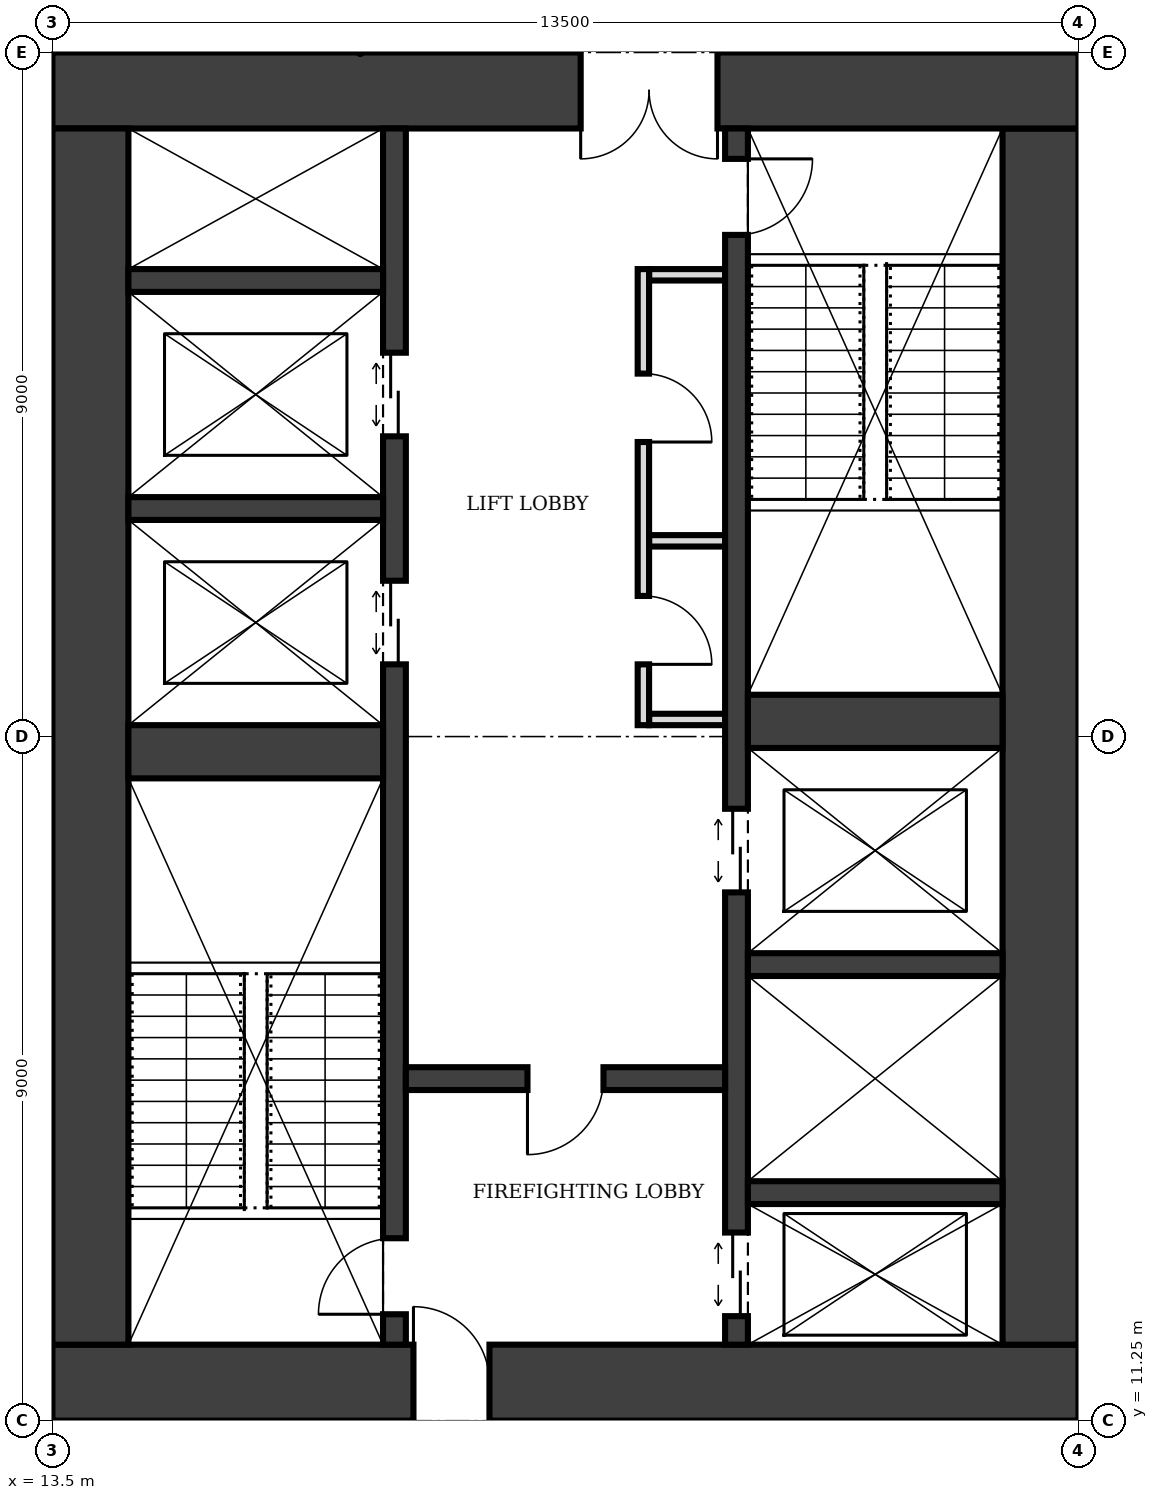
"""IFC4 building model, lengths in metres.
Left out: names, types, materials, properties, quantities, classifications, styles, units other than length and angle.
Written with IfcOpenShell. Run it as: python <this file> out.ifc"""

import sys

from ifc_helpers import new_model, si_unit, direction, frame, frame_2d, origin, place, context, subcontext, project, spatial, rectangle, extrude, element, fill, save


model = new_model("IFC4")
c1 = context("Model", 3, precision=1e-05, world=origin(), true_north=direction((0.0, 1.0)))
c2 = subcontext(c1, "Body", "Model", "MODEL_VIEW")
j1 = project(units=[si_unit("LENGTHUNIT", "METRE"), si_unit("PLANEANGLEUNIT", "RADIAN")], contexts=[c1])
p1 = place(None, origin())
s1 = spatial("IfcSite", under=j1, at=p1, CompositionType="ELEMENT")
p2 = place(p1, origin())
s2 = spatial("IfcBuilding", under=s1, at=p2, CompositionType="ELEMENT")
p3 = place(p2, frame((0.0, 0.0, 49.0)))
s3 = spatial("IfcBuildingStorey", under=s2, at=p3, CompositionType="ELEMENT", Elevation=49.0)
p4 = place(p3, frame((13.5, 11.75, 0.0), z_axis=(0.0, 0.0, 1.0), x_axis=(1.0, 0.0, 0.0)))
e1 = element("IfcWall", 1, at=p4, inside=s3, PredefinedType="SHEAR", context=c2, shape_type="SweptSolid", body=[
    extrude(rectangle(XDim=13.5, YDim=1.0, at=frame_2d((6.75, 0.0))), origin(), (0.0, 0.0, 1.0), 4.0),
])
p5 = place(p4, frame((4.75, 0.0, 0.0)))
e2 = element("IfcOpeningElement", 2, at=p5, cuts=e1, PredefinedType="OPENING", context=c2, shape_type="SweptSolid", body=[
    extrude(rectangle(XDim=1.0, YDim=2.1, at=frame_2d((0.5, 1.05))), frame((0.0, 0.51, 0.0), z_axis=(0.0, -1.0, 0.0), x_axis=(1.0, 0.0, 0.0)), (0.0, 0.0, 1.0), 1.02),
])
p6 = place(p3, frame((26.5, 12.25, 0.0), z_axis=(0.0, 0.0, 1.0), x_axis=(0.0, 1.0, 0.0)))
e3 = element("IfcWall", 3, at=p6, inside=s3, PredefinedType="SHEAR", context=c2, shape_type="SweptSolid", body=[
    extrude(rectangle(XDim=16.0, YDim=1.0, at=frame_2d((8.0, 0.0))), origin(), (0.0, 0.0, 1.0), 4.0),
])
p7 = place(p3, frame((27.0, 28.75, 0.0), z_axis=(0.0, 0.0, 1.0), x_axis=(-1.0, 0.0, 0.0)))
e4 = element("IfcWall", 4, at=p7, inside=s3, PredefinedType="SHEAR", context=c2, shape_type="SweptSolid", body=[
    extrude(rectangle(XDim=13.5, YDim=1.0, at=frame_2d((6.75, 0.0))), origin(), (0.0, 0.0, 1.0), 4.0),
])
p8 = place(p7, frame((4.75, 0.0, 0.0)))
e5 = element("IfcOpeningElement", 5, at=p8, cuts=e4, PredefinedType="OPENING", context=c2, shape_type="SweptSolid", body=[
    extrude(rectangle(XDim=1.8, YDim=2.1, at=frame_2d((0.9, 1.05))), frame((0.0, 0.51, 0.0), z_axis=(0.0, -1.0, 0.0), x_axis=(1.0, 0.0, 0.0)), (0.0, 0.0, 1.0), 1.02),
])
p9 = place(p3, frame((14.0, 28.25, 0.0), z_axis=(0.0, 0.0, 1.0), x_axis=(0.0, -1.0, 0.0)))
e6 = element("IfcWall", 6, at=p9, inside=s3, PredefinedType="SHEAR", context=c2, shape_type="SweptSolid", body=[
    extrude(rectangle(XDim=16.0, YDim=1.0, at=frame_2d((8.0, 0.0))), origin(), (0.0, 0.0, 1.0), 4.0),
])
p10 = place(p3, frame((18.0, 12.25, 0.0), z_axis=(0.0, 0.0, 1.0), x_axis=(0.0, 1.0, 0.0)))
e7 = element("IfcWall", 7, at=p10, inside=s3, PredefinedType="SHEAR", context=c2, shape_type="SweptSolid", body=[
    extrude(rectangle(XDim=16.0, YDim=0.3, at=frame_2d((8.0, 0.0))), origin(), (0.0, 0.0, 1.0), 4.0),
])
p11 = place(p10, frame((0.4, 0.0, 0.0)))
e8 = element("IfcOpeningElement", 8, at=p11, cuts=e7, PredefinedType="OPENING", context=c2, shape_type="SweptSolid", body=[
    extrude(rectangle(XDim=1.0, YDim=2.1, at=frame_2d((0.5, 1.05))), frame((0.0, 0.16, 0.0), z_axis=(0.0, -1.0, 0.0), x_axis=(1.0, 0.0, 0.0)), (0.0, 0.0, 1.0), 0.32),
])
p12 = place(p10, frame((8.95, 0.0, 0.0)))
e9 = element("IfcOpeningElement", 9, at=p12, cuts=e7, PredefinedType="OPENING", context=c2, shape_type="SweptSolid", body=[
    extrude(rectangle(XDim=1.1, YDim=2.1, at=frame_2d((0.55, 1.05))), frame((0.0, 0.16, 0.0), z_axis=(0.0, -1.0, 0.0), x_axis=(1.0, 0.0, 0.0)), (0.0, 0.0, 1.0), 0.32),
])
p13 = place(p10, frame((11.95, 0.0, 0.0)))
e10 = element("IfcOpeningElement", 10, at=p13, cuts=e7, PredefinedType="OPENING", context=c2, shape_type="SweptSolid", body=[
    extrude(rectangle(XDim=1.1, YDim=2.1, at=frame_2d((0.55, 1.05))), frame((0.0, 0.16, 0.0), z_axis=(0.0, -1.0, 0.0), x_axis=(1.0, 0.0, 0.0)), (0.0, 0.0, 1.0), 0.32),
])
p14 = place(p3, frame((22.5, 12.25, 0.0), z_axis=(0.0, 0.0, 1.0), x_axis=(0.0, 1.0, 0.0)))
e11 = element("IfcWall", 11, at=p14, inside=s3, PredefinedType="SHEAR", context=c2, shape_type="SweptSolid", body=[
    extrude(rectangle(XDim=16.0, YDim=0.3, at=frame_2d((8.0, 0.0))), origin(), (0.0, 0.0, 1.0), 4.0),
])
p15 = place(p14, frame((14.6, 0.0, 0.0)))
e12 = element("IfcOpeningElement", 12, at=p15, cuts=e11, PredefinedType="OPENING", context=c2, shape_type="SweptSolid", body=[
    extrude(rectangle(XDim=1.0, YDim=2.1, at=frame_2d((0.5, 1.05))), frame((0.0, 0.16, 0.0), z_axis=(0.0, -1.0, 0.0), x_axis=(1.0, 0.0, 0.0)), (0.0, 0.0, 1.0), 0.32),
])
p16 = place(p14, frame((0.375, 0.0, 0.0)))
e13 = element("IfcOpeningElement", 13, at=p16, cuts=e11, PredefinedType="OPENING", context=c2, shape_type="SweptSolid", body=[
    extrude(rectangle(XDim=1.1, YDim=2.1, at=frame_2d((0.55, 1.05))), frame((0.0, 0.16, 0.0), z_axis=(0.0, -1.0, 0.0), x_axis=(1.0, 0.0, 0.0)), (0.0, 0.0, 1.0), 0.32),
])
p17 = place(p14, frame((5.95, 0.0, 0.0)))
e14 = element("IfcOpeningElement", 14, at=p17, cuts=e11, PredefinedType="OPENING", context=c2, shape_type="SweptSolid", body=[
    extrude(rectangle(XDim=1.1, YDim=2.1, at=frame_2d((0.55, 1.05))), frame((0.0, 0.16, 0.0), z_axis=(0.0, -1.0, 0.0), x_axis=(1.0, 0.0, 0.0)), (0.0, 0.0, 1.0), 0.32),
])
p18 = place(p3, frame((14.5, 20.05, 0.0), z_axis=(0.0, 0.0, 1.0), x_axis=(1.0, 0.0, 0.0)))
e15 = element("IfcWall", 15, at=p18, inside=s3, PredefinedType="SHEAR", context=c2, shape_type="SweptSolid", body=[
    extrude(rectangle(XDim=3.35, YDim=0.7, at=frame_2d((1.675, 0.0))), origin(), (0.0, 0.0, 1.0), 4.0),
])
p19 = place(p3, frame((18.15, 15.75, 0.0), z_axis=(0.0, 0.0, 1.0), x_axis=(1.0, 0.0, 0.0)))
e16 = element("IfcWall", 16, at=p19, inside=s3, PredefinedType="SHEAR", context=c2, shape_type="SweptSolid", body=[
    extrude(rectangle(XDim=4.2, YDim=0.3, at=frame_2d((2.1, 0.0))), origin(), (0.0, 0.0, 1.0), 4.0),
])
p20 = place(p19, frame((1.6, 0.0, 0.0)))
e17 = element("IfcOpeningElement", 17, at=p20, cuts=e16, PredefinedType="OPENING", context=c2, shape_type="SweptSolid", body=[
    extrude(rectangle(XDim=1.0, YDim=2.1, at=frame_2d((0.5, 1.05))), frame((0.0, 0.16, 0.0), z_axis=(0.0, -1.0, 0.0), x_axis=(1.0, 0.0, 0.0)), (0.0, 0.0, 1.0), 0.32),
])
for number, where, z_axis, x_axis in (
    (18, (22.65, 14.25, 0.0), (0.0, 0.0, 1.0), (1.0, 0.0, 0.0)),
    (19, (22.65, 17.25, 0.0), (0.0, 0.0, 1.0), (1.0, 0.0, 0.0)),
):
    element("IfcWall", number, at=place(p3, frame(where, z_axis=z_axis, x_axis=x_axis)), inside=s3, PredefinedType="SHEAR", context=c2, shape_type="SweptSolid", body=[
        extrude(rectangle(XDim=3.35, YDim=0.3, at=frame_2d((1.675, 0.0))), origin(), (0.0, 0.0, 1.0), 4.0),
    ])
p21 = place(p3, frame((22.65, 20.45, 0.0), z_axis=(0.0, 0.0, 1.0), x_axis=(1.0, 0.0, 0.0)))
e20 = element("IfcWall", 20, at=p21, inside=s3, PredefinedType="SHEAR", context=c2, shape_type="SweptSolid", body=[
    extrude(rectangle(XDim=3.35, YDim=0.7, at=frame_2d((1.675, 0.0))), origin(), (0.0, 0.0, 1.0), 4.0),
])
for number, where, z_axis, x_axis in (
    (21, (14.5, 23.25, 0.0), (0.0, 0.0, 1.0), (1.0, 0.0, 0.0)),
    (22, (14.5, 26.25, 0.0), (0.0, 0.0, 1.0), (1.0, 0.0, 0.0)),
):
    element("IfcWall", number, at=place(p3, frame(where, z_axis=z_axis, x_axis=x_axis)), inside=s3, PredefinedType="SHEAR", context=c2, shape_type="SweptSolid", body=[
        extrude(rectangle(XDim=3.35, YDim=0.3, at=frame_2d((1.675, 0.0))), origin(), (0.0, 0.0, 1.0), 4.0),
    ])
p22 = place(p3, frame((21.275, 20.4, 0.0), z_axis=(0.0, 0.0, 1.0), x_axis=(0.0, 1.0, 0.0)))
e23 = element("IfcWall", 23, at=p22, inside=s3, PredefinedType="PARTITIONING", context=c2, shape_type="SweptSolid", body=[
    extrude(rectangle(XDim=6.0, YDim=0.15, at=frame_2d((3.0, 0.0))), origin(), (0.0, 0.0, 1.0), 3.75),
])
p23 = place(p22, frame((0.8, 0.0, 0.0)))
e24 = element("IfcOpeningElement", 24, at=p23, cuts=e23, PredefinedType="OPENING", context=c2, shape_type="SweptSolid", body=[
    extrude(rectangle(XDim=0.9, YDim=2.1, at=frame_2d((0.45, 1.05))), frame((0.0, 0.085, 0.0), z_axis=(0.0, -1.0, 0.0), x_axis=(1.0, 0.0, 0.0)), (0.0, 0.0, 1.0), 0.17),
])
p24 = place(p22, frame((3.725, 0.0, 0.0)))
e25 = element("IfcOpeningElement", 25, at=p24, cuts=e23, PredefinedType="OPENING", context=c2, shape_type="SweptSolid", body=[
    extrude(rectangle(XDim=0.9, YDim=2.1, at=frame_2d((0.45, 1.05))), frame((0.0, 0.085, 0.0), z_axis=(0.0, -1.0, 0.0), x_axis=(1.0, 0.0, 0.0)), (0.0, 0.0, 1.0), 0.17),
])
for number, where, z_axis, x_axis in (
    (26, (21.35, 20.475, 0.0), (0.0, 0.0, 1.0), (1.0, 0.0, 0.0)),
    (27, (21.35, 22.825, 0.0), (0.0, 0.0, 1.0), (1.0, 0.0, 0.0)),
    (28, (21.35, 26.325, 0.0), (0.0, 0.0, 1.0), (1.0, 0.0, 0.0)),
):
    element("IfcWall", number, at=place(p3, frame(where, z_axis=z_axis, x_axis=x_axis)), inside=s3, PredefinedType="PARTITIONING", context=c2, shape_type="SweptSolid", body=[
        extrude(rectangle(XDim=1.0, YDim=0.15, at=frame_2d((0.5, 0.0))), origin(), (0.0, 0.0, 1.0), 3.75),
    ])
p25 = place(p5, origin())
e29 = element("IfcDoor", 29, at=p25, inside=s3, OperationType="SINGLE_SWING_LEFT", PredefinedType="DOOR", context=c2, shape_type="SweptSolid", body=[
    extrude(rectangle(XDim=1.0, YDim=2.1, at=frame_2d((0.5, 1.05))), frame((0.0, 0.025, 0.0), z_axis=(0.0, -1.0, 0.0), x_axis=(1.0, 0.0, 0.0)), (0.0, 0.0, 1.0), 0.05),
])
fill(e2, e29)
p26 = place(p8, origin())
e30 = element("IfcDoor", 30, at=p26, inside=s3, OperationType="DOUBLE_DOOR_SINGLE_SWING", PredefinedType="DOOR", context=c2, shape_type="SweptSolid", body=[
    extrude(rectangle(XDim=1.8, YDim=2.1, at=frame_2d((0.9, 1.05))), frame((0.0, 0.025, 0.0), z_axis=(0.0, -1.0, 0.0), x_axis=(1.0, 0.0, 0.0)), (0.0, 0.0, 1.0), 0.05),
])
fill(e5, e30)
p27 = place(p20, frame((1.0, 0.0, 0.0), z_axis=(0.0, 0.0, 1.0), x_axis=(-1.0, 0.0, 0.0)))
e31 = element("IfcDoor", 31, at=p27, inside=s3, OperationType="SINGLE_SWING_RIGHT", PredefinedType="DOOR", context=c2, shape_type="SweptSolid", body=[
    extrude(rectangle(XDim=1.0, YDim=2.1, at=frame_2d((0.5, 1.05))), frame((0.0, 0.025, 0.0), z_axis=(0.0, -1.0, 0.0), x_axis=(1.0, 0.0, 0.0)), (0.0, 0.0, 1.0), 0.05),
])
fill(e17, e31)
p28 = place(p11, origin())
e32 = element("IfcDoor", 32, at=p28, inside=s3, OperationType="SINGLE_SWING_LEFT", PredefinedType="DOOR", context=c2, shape_type="SweptSolid", body=[
    extrude(rectangle(XDim=1.0, YDim=2.1, at=frame_2d((0.5, 1.05))), frame((0.0, 0.025, 0.0), z_axis=(0.0, -1.0, 0.0), x_axis=(1.0, 0.0, 0.0)), (0.0, 0.0, 1.0), 0.05),
])
fill(e8, e32)
p29 = place(p15, frame((1.0, 0.0, 0.0), z_axis=(0.0, 0.0, 1.0), x_axis=(-1.0, 0.0, 0.0)))
e33 = element("IfcDoor", 33, at=p29, inside=s3, OperationType="SINGLE_SWING_LEFT", PredefinedType="DOOR", context=c2, shape_type="SweptSolid", body=[
    extrude(rectangle(XDim=1.0, YDim=2.1, at=frame_2d((0.5, 1.05))), frame((0.0, 0.025, 0.0), z_axis=(0.0, -1.0, 0.0), x_axis=(1.0, 0.0, 0.0)), (0.0, 0.0, 1.0), 0.05),
])
fill(e12, e33)
p30 = place(p16, origin())
e34 = element("IfcDoor", 34, at=p30, inside=s3, OperationType="DOUBLE_DOOR_SLIDING", PredefinedType="DOOR", context=c2, shape_type="SweptSolid", body=[
    extrude(rectangle(XDim=1.1, YDim=2.1, at=frame_2d((0.55, 1.05))), frame((0.0, 0.025, 0.0), z_axis=(0.0, -1.0, 0.0), x_axis=(1.0, 0.0, 0.0)), (0.0, 0.0, 1.0), 0.05),
])
fill(e13, e34)
p31 = place(p12, origin())
e35 = element("IfcDoor", 35, at=p31, inside=s3, OperationType="DOUBLE_DOOR_SLIDING", PredefinedType="DOOR", context=c2, shape_type="SweptSolid", body=[
    extrude(rectangle(XDim=1.1, YDim=2.1, at=frame_2d((0.55, 1.05))), frame((0.0, 0.025, 0.0), z_axis=(0.0, -1.0, 0.0), x_axis=(1.0, 0.0, 0.0)), (0.0, 0.0, 1.0), 0.05),
])
fill(e9, e35)
p32 = place(p13, origin())
e36 = element("IfcDoor", 36, at=p32, inside=s3, OperationType="DOUBLE_DOOR_SLIDING", PredefinedType="DOOR", context=c2, shape_type="SweptSolid", body=[
    extrude(rectangle(XDim=1.1, YDim=2.1, at=frame_2d((0.55, 1.05))), frame((0.0, 0.025, 0.0), z_axis=(0.0, -1.0, 0.0), x_axis=(1.0, 0.0, 0.0)), (0.0, 0.0, 1.0), 0.05),
])
fill(e10, e36)
p33 = place(p17, origin())
e37 = element("IfcDoor", 37, at=p33, inside=s3, OperationType="DOUBLE_DOOR_SLIDING", PredefinedType="DOOR", context=c2, shape_type="SweptSolid", body=[
    extrude(rectangle(XDim=1.1, YDim=2.1, at=frame_2d((0.55, 1.05))), frame((0.0, 0.025, 0.0), z_axis=(0.0, -1.0, 0.0), x_axis=(1.0, 0.0, 0.0)), (0.0, 0.0, 1.0), 0.05),
])
fill(e14, e37)
p34 = place(p23, frame((0.9, 0.0, 0.0), z_axis=(0.0, 0.0, 1.0), x_axis=(-1.0, 0.0, 0.0)))
e38 = element("IfcDoor", 38, at=p34, inside=s3, OperationType="SINGLE_SWING_RIGHT", PredefinedType="DOOR", context=c2, shape_type="SweptSolid", body=[
    extrude(rectangle(XDim=0.9, YDim=2.1, at=frame_2d((0.45, 1.05))), frame((0.0, 0.025, 0.0), z_axis=(0.0, -1.0, 0.0), x_axis=(1.0, 0.0, 0.0)), (0.0, 0.0, 1.0), 0.05),
])
fill(e24, e38)
p35 = place(p24, frame((0.9, 0.0, 0.0), z_axis=(0.0, 0.0, 1.0), x_axis=(-1.0, 0.0, 0.0)))
e39 = element("IfcDoor", 39, at=p35, inside=s3, OperationType="SINGLE_SWING_RIGHT", PredefinedType="DOOR", context=c2, shape_type="SweptSolid", body=[
    extrude(rectangle(XDim=0.9, YDim=2.1, at=frame_2d((0.45, 1.05))), frame((0.0, 0.025, 0.0), z_axis=(0.0, -1.0, 0.0), x_axis=(1.0, 0.0, 0.0)), (0.0, 0.0, 1.0), 0.05),
])
fill(e25, e39)
save(model, sys.argv[1])
